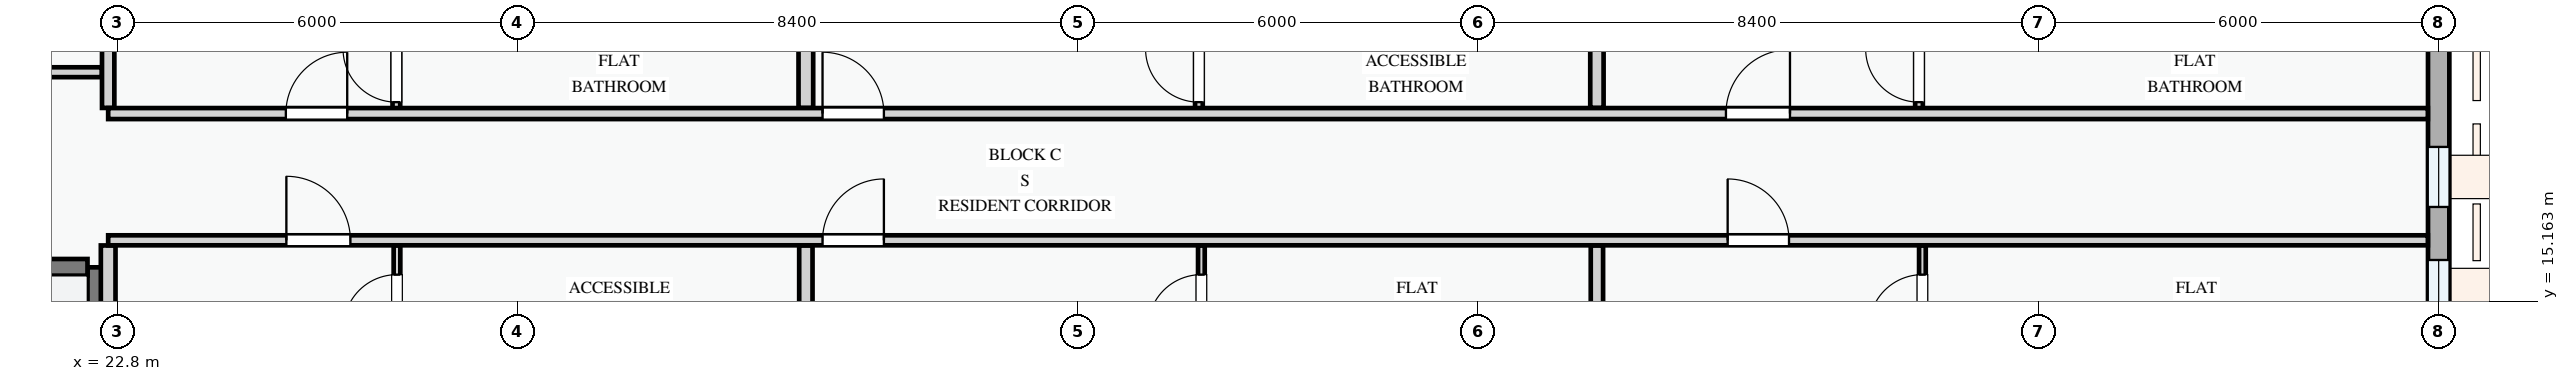
"""IFC4 building model, lengths in metres.
Left out: names, types, materials, properties, quantities, classifications, styles, units other than length and angle.
Written with IfcOpenShell. Run it as: python <this file> out.ifc"""

import sys

from ifc_helpers import new_model, si_unit, direction, frame, frame_2d, origin, place, context, subcontext, project, spatial, rectangle, extrude, element, fill, save


model = new_model("IFC4")
c1 = context("Model", 3, precision=1e-05, world=origin(), true_north=direction((0.0, 1.0)))
c2 = subcontext(c1, "Body", "Model", "MODEL_VIEW")
j1 = project(units=[si_unit("LENGTHUNIT", "METRE"), si_unit("PLANEANGLEUNIT", "RADIAN")], contexts=[c1])
p1 = place(None, origin())
s1 = spatial("IfcSite", under=j1, at=p1, CompositionType="ELEMENT")
p2 = place(p1, origin())
s2 = spatial("IfcBuilding", under=s1, at=p2, CompositionType="ELEMENT")
p3 = place(p2, frame((0.0, 0.0, 14.7)))
s3 = spatial("IfcBuildingStorey", under=s2, at=p3, CompositionType="ELEMENT", Elevation=14.7)
p4 = place(p3, frame((57.6, 14.4, 0.0), z_axis=(0.0, 0.0, 1.0), x_axis=(0.0, 1.0, 0.0)))
e1 = element("IfcWall", 1, at=p4, inside=s3, PredefinedType="STANDARD", context=c2, shape_type="SweptSolid", body=[
    extrude(rectangle(XDim=8.4, YDim=0.32, at=frame_2d((4.2, 0.0))), origin(), (0.0, 0.0, 1.0), 2.425),
])
p5 = place(p4, frame((0.485, 0.0, 0.78)))
e2 = element("IfcOpeningElement", 2, at=p5, cuts=e1, PredefinedType="OPENING", context=c2, shape_type="SweptSolid", body=[
    extrude(rectangle(XDim=0.9, YDim=1.2, at=frame_2d((0.45, 0.6))), frame((0.0, 0.17, 0.0), z_axis=(0.0, -1.0, 0.0), x_axis=(1.0, 0.0, 0.0)), (0.0, 0.0, 1.0), 0.34),
])
p6 = place(p4, frame((2.18, 0.0, 0.78)))
e3 = element("IfcOpeningElement", 3, at=p6, cuts=e1, PredefinedType="OPENING", context=c2, shape_type="SweptSolid", body=[
    extrude(rectangle(XDim=0.9, YDim=1.2, at=frame_2d((0.45, 0.6))), frame((0.0, 0.17, 0.0), z_axis=(0.0, -1.0, 0.0), x_axis=(1.0, 0.0, 0.0)), (0.0, 0.0, 1.0), 0.34),
])
p7 = place(p4, frame((6.483, 0.0, 0.78)))
e4 = element("IfcOpeningElement", 4, at=p7, cuts=e1, PredefinedType="OPENING", context=c2, shape_type="SweptSolid", body=[
    extrude(rectangle(XDim=1.3, YDim=1.4, at=frame_2d((0.65, 0.7))), frame((0.0, 0.17, 0.0), z_axis=(0.0, -1.0, 0.0), x_axis=(1.0, 0.0, 0.0)), (0.0, 0.0, 1.0), 0.34),
])
p8 = place(p3, frame((22.475, 8.75, 0.0), z_axis=(0.0, 0.0, 1.0), x_axis=(0.0, 1.0, 0.0)))
e5 = element("IfcWall", 5, at=p8, inside=s3, PredefinedType="SHEAR", context=c2, shape_type="SweptSolid", body=[
    extrude(rectangle(XDim=6.925, YDim=0.25, at=frame_2d((3.462, 0.0))), origin(), (0.0, 0.0, 1.0), 3.0),
])
p9 = place(p3, frame((8.85, 15.675, 0.0), z_axis=(0.0, 0.0, 1.0), x_axis=(1.0, 0.0, 0.0)))
e6 = element("IfcWall", 6, at=p9, inside=s3, PredefinedType="SHEAR", context=c2, shape_type="SweptSolid", body=[
    extrude(rectangle(XDim=13.5, YDim=0.25, at=frame_2d((6.75, 0.0))), origin(), (0.0, 0.0, 1.0), 3.0),
])
p10 = place(p9, frame((6.2, 0.0, 0.0)))
e7 = element("IfcOpeningElement", 7, at=p10, cuts=e6, PredefinedType="OPENING", context=c2, shape_type="SweptSolid", body=[
    extrude(rectangle(XDim=1.1, YDim=2.15, at=frame_2d((0.55, 1.075))), frame((0.0, 0.135, 0.0), z_axis=(0.0, -1.0, 0.0), x_axis=(1.0, 0.0, 0.0)), (0.0, 0.0, 1.0), 0.27),
])
p11 = place(p3, frame((18.025, 18.6, 0.0), z_axis=(0.0, 0.0, 1.0), x_axis=(1.0, 0.0, 0.0)))
e8 = element("IfcWall", 8, at=p11, inside=s3, PredefinedType="PARTITIONING", context=c2, shape_type="SweptSolid", body=[
    extrude(rectangle(XDim=4.541, YDim=0.148, at=frame_2d((2.27, 0.0))), origin(), (0.0, 0.0, 1.0), 3.0),
])
p12 = place(p11, frame((1.65, 0.0, 0.0)))
e9 = element("IfcOpeningElement", 9, at=p12, cuts=e8, PredefinedType="OPENING", context=c2, shape_type="SweptSolid", body=[
    extrude(rectangle(XDim=1.0, YDim=2.15, at=frame_2d((0.5, 1.075))), frame((0.0, 0.084, 0.0), z_axis=(0.0, -1.0, 0.0), x_axis=(1.0, 0.0, 0.0)), (0.0, 0.0, 1.0), 0.168),
])
p13 = place(p3, frame((26.99, 8.562, 0.0), z_axis=(0.0, 0.0, 1.0), x_axis=(0.0, 1.0, 0.0)))
e10 = element("IfcWall", 10, at=p13, inside=s3, PredefinedType="PARTITIONING", context=c2, shape_type="SweptSolid", body=[
    extrude(rectangle(XDim=7.441, YDim=0.1, at=frame_2d((3.72, 0.0))), origin(), (0.0, 0.0, 1.0), 3.0),
])
p14 = place(p13, frame((1.302, 0.0, 0.0)))
e11 = element("IfcOpeningElement", 11, at=p14, cuts=e10, PredefinedType="OPENING", context=c2, shape_type="SweptSolid", body=[
    extrude(rectangle(XDim=0.85, YDim=2.1, at=frame_2d((0.425, 1.05))), frame((0.0, 0.06, 0.0), z_axis=(0.0, -1.0, 0.0), x_axis=(1.0, 0.0, 0.0)), (0.0, 0.0, 1.0), 0.12),
])
p15 = place(p13, frame((4.198, 0.0, 0.0)))
e12 = element("IfcOpeningElement", 12, at=p15, cuts=e10, PredefinedType="OPENING", context=c2, shape_type="SweptSolid", body=[
    extrude(rectangle(XDim=0.85, YDim=2.1, at=frame_2d((0.425, 1.05))), frame((0.0, 0.06, 0.0), z_axis=(0.0, -1.0, 0.0), x_axis=(1.0, 0.0, 0.0)), (0.0, 0.0, 1.0), 0.12),
])
p16 = place(p13, frame((6.204, 0.0, 0.0)))
e13 = element("IfcOpeningElement", 13, at=p16, cuts=e10, PredefinedType="OPENING", context=c2, shape_type="SweptSolid", body=[
    extrude(rectangle(XDim=0.8, YDim=2.1, at=frame_2d((0.4, 1.05))), frame((0.0, 0.06, 0.0), z_axis=(0.0, -1.0, 0.0), x_axis=(1.0, 0.0, 0.0)), (0.0, 0.0, 1.0), 0.12),
])
p17 = place(p3, frame((26.981, 17.98, 0.0), z_axis=(0.0, 0.0, 1.0), x_axis=(0.0, 1.0, 0.0)))
e14 = element("IfcWall", 14, at=p17, inside=s3, PredefinedType="PARTITIONING", context=c2, shape_type="SweptSolid", body=[
    extrude(rectangle(XDim=4.658, YDim=0.115, at=frame_2d((2.329, 0.0))), origin(), (0.0, 0.0, 1.0), 3.0),
])
p18 = place(p17, frame((0.171, 0.0, 0.0)))
e15 = element("IfcOpeningElement", 15, at=p18, cuts=e14, PredefinedType="OPENING", context=c2, shape_type="SweptSolid", body=[
    extrude(rectangle(XDim=0.8, YDim=2.1, at=frame_2d((0.4, 1.05))), frame((0.0, 0.067, 0.0), z_axis=(0.0, -1.0, 0.0), x_axis=(1.0, 0.0, 0.0)), (0.0, 0.0, 1.0), 0.135),
])
p19 = place(p17, frame((1.384, 0.0, 0.0)))
e16 = element("IfcOpeningElement", 16, at=p19, cuts=e14, PredefinedType="OPENING", context=c2, shape_type="SweptSolid", body=[
    extrude(rectangle(XDim=0.85, YDim=2.1, at=frame_2d((0.425, 1.05))), frame((0.0, 0.067, 0.0), z_axis=(0.0, -1.0, 0.0), x_axis=(1.0, 0.0, 0.0)), (0.0, 0.0, 1.0), 0.135),
])
p20 = place(p17, frame((3.193, 0.0, 0.0)))
e17 = element("IfcOpeningElement", 17, at=p20, cuts=e14, PredefinedType="OPENING", context=c2, shape_type="SweptSolid", body=[
    extrude(rectangle(XDim=0.85, YDim=2.1, at=frame_2d((0.425, 1.05))), frame((0.0, 0.067, 0.0), z_axis=(0.0, -1.0, 0.0), x_axis=(1.0, 0.0, 0.0)), (0.0, 0.0, 1.0), 0.135),
])
p21 = place(p3, frame((22.66, 8.562, 0.0), z_axis=(0.0, 0.0, 1.0), x_axis=(0.0, 1.0, 0.0)))
e18 = element("IfcWall", 18, at=p21, inside=s3, PredefinedType="PARTITIONING", context=c2, shape_type="SweptSolid", body=[
    extrude(rectangle(XDim=7.441, YDim=0.22, at=frame_2d((3.72, 0.0))), origin(), (0.0, 0.0, 1.0), 2.425),
])
p22 = place(p3, frame((22.66, 18.064, 0.0), z_axis=(0.0, 0.0, 1.0), x_axis=(0.0, 1.0, 0.0)))
e19 = element("IfcWall", 19, at=p22, inside=s3, PredefinedType="PARTITIONING", context=c2, shape_type="SweptSolid", body=[
    extrude(rectangle(XDim=4.676, YDim=0.185, at=frame_2d((2.338, 0.0))), origin(), (0.0, 0.0, 1.0), 2.425),
])
p23 = place(p3, frame((39.05, 8.562, 0.0), z_axis=(0.0, 0.0, 1.0), x_axis=(0.0, 1.0, 0.0)))
e20 = element("IfcWall", 20, at=p23, inside=s3, PredefinedType="PARTITIONING", context=c2, shape_type="SweptSolid", body=[
    extrude(rectangle(XDim=7.441, YDim=0.1, at=frame_2d((3.72, 0.0))), origin(), (0.0, 0.0, 1.0), 3.0),
])
p24 = place(p23, frame((1.302, 0.0, 0.0)))
e21 = element("IfcOpeningElement", 21, at=p24, cuts=e20, PredefinedType="OPENING", context=c2, shape_type="SweptSolid", body=[
    extrude(rectangle(XDim=0.82, YDim=2.08, at=frame_2d((0.41, 1.04))), frame((0.0, 0.06, 0.0), z_axis=(0.0, -1.0, 0.0), x_axis=(1.0, 0.0, 0.0)), (0.0, 0.0, 1.0), 0.12),
])
p25 = place(p23, frame((4.198, 0.0, 0.0)))
e22 = element("IfcOpeningElement", 22, at=p25, cuts=e20, PredefinedType="OPENING", context=c2, shape_type="SweptSolid", body=[
    extrude(rectangle(XDim=0.85, YDim=2.1, at=frame_2d((0.425, 1.05))), frame((0.0, 0.06, 0.0), z_axis=(0.0, -1.0, 0.0), x_axis=(1.0, 0.0, 0.0)), (0.0, 0.0, 1.0), 0.12),
])
p26 = place(p23, frame((6.204, 0.0, 0.0)))
e23 = element("IfcOpeningElement", 23, at=p26, cuts=e20, PredefinedType="OPENING", context=c2, shape_type="SweptSolid", body=[
    extrude(rectangle(XDim=0.8, YDim=2.1, at=frame_2d((0.4, 1.05))), frame((0.0, 0.06, 0.0), z_axis=(0.0, -1.0, 0.0), x_axis=(1.0, 0.0, 0.0)), (0.0, 0.0, 1.0), 0.12),
])
p27 = place(p3, frame((39.013, 17.98, 0.0), z_axis=(0.0, 0.0, 1.0), x_axis=(0.0, 1.0, 0.0)))
e24 = element("IfcWall", 24, at=p27, inside=s3, PredefinedType="PARTITIONING", context=c2, shape_type="SweptSolid", body=[
    extrude(rectangle(XDim=4.658, YDim=0.115, at=frame_2d((2.329, 0.0))), origin(), (0.0, 0.0, 1.0), 3.0),
])
p28 = place(p27, frame((0.171, 0.0, 0.0)))
e25 = element("IfcOpeningElement", 25, at=p28, cuts=e24, PredefinedType="OPENING", context=c2, shape_type="SweptSolid", body=[
    extrude(rectangle(XDim=0.8, YDim=2.1, at=frame_2d((0.4, 1.05))), frame((0.0, 0.067, 0.0), z_axis=(0.0, -1.0, 0.0), x_axis=(1.0, 0.0, 0.0)), (0.0, 0.0, 1.0), 0.135),
])
p29 = place(p27, frame((1.384, 0.0, 0.0)))
e26 = element("IfcOpeningElement", 26, at=p29, cuts=e24, PredefinedType="OPENING", context=c2, shape_type="SweptSolid", body=[
    extrude(rectangle(XDim=0.82, YDim=2.08, at=frame_2d((0.41, 1.04))), frame((0.0, 0.067, 0.0), z_axis=(0.0, -1.0, 0.0), x_axis=(1.0, 0.0, 0.0)), (0.0, 0.0, 1.0), 0.135),
])
p30 = place(p27, frame((3.193, 0.0, 0.0)))
e27 = element("IfcOpeningElement", 27, at=p30, cuts=e24, PredefinedType="OPENING", context=c2, shape_type="SweptSolid", body=[
    extrude(rectangle(XDim=0.85, YDim=2.1, at=frame_2d((0.425, 1.05))), frame((0.0, 0.067, 0.0), z_axis=(0.0, -1.0, 0.0), x_axis=(1.0, 0.0, 0.0)), (0.0, 0.0, 1.0), 0.135),
])
p31 = place(p3, frame((33.12, 8.562, 0.0), z_axis=(0.0, 0.0, 1.0), x_axis=(0.0, 1.0, 0.0)))
e28 = element("IfcWall", 28, at=p31, inside=s3, PredefinedType="PARTITIONING", context=c2, shape_type="SweptSolid", body=[
    extrude(rectangle(XDim=7.441, YDim=0.2, at=frame_2d((3.72, 0.0))), origin(), (0.0, 0.0, 1.0), 2.585),
])
p32 = place(p3, frame((33.12, 18.064, 0.0), z_axis=(0.0, 0.0, 1.0), x_axis=(0.0, 1.0, 0.0)))
e29 = element("IfcWall", 29, at=p32, inside=s3, PredefinedType="PARTITIONING", context=c2, shape_type="SweptSolid", body=[
    extrude(rectangle(XDim=4.573, YDim=0.22, at=frame_2d((2.287, 0.0))), origin(), (0.0, 0.0, 1.0), 2.585),
])
p33 = place(p3, frame((49.86, 8.562, 0.0), z_axis=(0.0, 0.0, 1.0), x_axis=(0.0, 1.0, 0.0)))
e30 = element("IfcWall", 30, at=p33, inside=s3, PredefinedType="PARTITIONING", context=c2, shape_type="SweptSolid", body=[
    extrude(rectangle(XDim=7.441, YDim=0.1, at=frame_2d((3.72, 0.0))), origin(), (0.0, 0.0, 1.0), 3.0),
])
p34 = place(p33, frame((1.302, 0.0, 0.0)))
e31 = element("IfcOpeningElement", 31, at=p34, cuts=e30, PredefinedType="OPENING", context=c2, shape_type="SweptSolid", body=[
    extrude(rectangle(XDim=0.85, YDim=2.1, at=frame_2d((0.425, 1.05))), frame((0.0, 0.06, 0.0), z_axis=(0.0, -1.0, 0.0), x_axis=(1.0, 0.0, 0.0)), (0.0, 0.0, 1.0), 0.12),
])
p35 = place(p33, frame((4.198, 0.0, 0.0)))
e32 = element("IfcOpeningElement", 32, at=p35, cuts=e30, PredefinedType="OPENING", context=c2, shape_type="SweptSolid", body=[
    extrude(rectangle(XDim=0.85, YDim=2.1, at=frame_2d((0.425, 1.05))), frame((0.0, 0.06, 0.0), z_axis=(0.0, -1.0, 0.0), x_axis=(1.0, 0.0, 0.0)), (0.0, 0.0, 1.0), 0.12),
])
p36 = place(p33, frame((6.204, 0.0, 0.0)))
e33 = element("IfcOpeningElement", 33, at=p36, cuts=e30, PredefinedType="OPENING", context=c2, shape_type="SweptSolid", body=[
    extrude(rectangle(XDim=0.8, YDim=2.1, at=frame_2d((0.4, 1.05))), frame((0.0, 0.06, 0.0), z_axis=(0.0, -1.0, 0.0), x_axis=(1.0, 0.0, 0.0)), (0.0, 0.0, 1.0), 0.12),
])
p37 = place(p3, frame((49.809, 17.98, 0.0), z_axis=(0.0, 0.0, 1.0), x_axis=(0.0, 1.0, 0.0)))
e34 = element("IfcWall", 34, at=p37, inside=s3, PredefinedType="PARTITIONING", context=c2, shape_type="SweptSolid", body=[
    extrude(rectangle(XDim=4.658, YDim=0.115, at=frame_2d((2.329, 0.0))), origin(), (0.0, 0.0, 1.0), 3.0),
])
p38 = place(p37, frame((0.171, 0.0, 0.0)))
e35 = element("IfcOpeningElement", 35, at=p38, cuts=e34, PredefinedType="OPENING", context=c2, shape_type="SweptSolid", body=[
    extrude(rectangle(XDim=0.8, YDim=2.1, at=frame_2d((0.4, 1.05))), frame((0.0, 0.067, 0.0), z_axis=(0.0, -1.0, 0.0), x_axis=(1.0, 0.0, 0.0)), (0.0, 0.0, 1.0), 0.135),
])
p39 = place(p37, frame((1.384, 0.0, 0.0)))
e36 = element("IfcOpeningElement", 36, at=p39, cuts=e34, PredefinedType="OPENING", context=c2, shape_type="SweptSolid", body=[
    extrude(rectangle(XDim=0.85, YDim=2.1, at=frame_2d((0.425, 1.05))), frame((0.0, 0.067, 0.0), z_axis=(0.0, -1.0, 0.0), x_axis=(1.0, 0.0, 0.0)), (0.0, 0.0, 1.0), 0.135),
])
p40 = place(p37, frame((3.193, 0.0, 0.0)))
e37 = element("IfcOpeningElement", 37, at=p40, cuts=e34, PredefinedType="OPENING", context=c2, shape_type="SweptSolid", body=[
    extrude(rectangle(XDim=0.85, YDim=2.1, at=frame_2d((0.425, 1.05))), frame((0.0, 0.067, 0.0), z_axis=(0.0, -1.0, 0.0), x_axis=(1.0, 0.0, 0.0)), (0.0, 0.0, 1.0), 0.135),
])
p41 = place(p3, frame((44.98, 8.562, 0.0), z_axis=(0.0, 0.0, 1.0), x_axis=(0.0, 1.0, 0.0)))
e38 = element("IfcWall", 38, at=p41, inside=s3, PredefinedType="PARTITIONING", context=c2, shape_type="SweptSolid", body=[
    extrude(rectangle(XDim=7.441, YDim=0.185, at=frame_2d((3.72, 0.0))), origin(), (0.0, 0.0, 1.0), 3.0),
])
p42 = place(p3, frame((44.98, 18.064, 0.0), z_axis=(0.0, 0.0, 1.0), x_axis=(0.0, 1.0, 0.0)))
e39 = element("IfcWall", 39, at=p42, inside=s3, PredefinedType="PARTITIONING", context=c2, shape_type="SweptSolid", body=[
    extrude(rectangle(XDim=4.573, YDim=0.2, at=frame_2d((2.287, 0.0))), origin(), (0.0, 0.0, 1.0), 3.0),
])
p43 = place(p3, frame((22.66, 16.08, 0.0), z_axis=(0.0, 0.0, 1.0), x_axis=(1.0, 0.0, 0.0)))
e40 = element("IfcWall", 40, at=p43, inside=s3, PredefinedType="PARTITIONING", context=c2, shape_type="SweptSolid", body=[
    extrude(rectangle(XDim=34.778, YDim=0.15, at=frame_2d((17.389, 0.0))), origin(), (0.0, 0.0, 1.0), 3.0),
])
p44 = place(p43, frame((2.672, 0.0, 0.0)))
e41 = element("IfcOpeningElement", 41, at=p44, cuts=e40, PredefinedType="OPENING", context=c2, shape_type="SweptSolid", body=[
    extrude(rectangle(XDim=0.96, YDim=2.12, at=frame_2d((0.48, 1.06))), frame((0.0, 0.085, 0.0), z_axis=(0.0, -1.0, 0.0), x_axis=(1.0, 0.0, 0.0)), (0.0, 0.0, 1.0), 0.17),
])
p45 = place(p43, frame((10.71, 0.0, 0.0)))
e42 = element("IfcOpeningElement", 42, at=p45, cuts=e40, PredefinedType="OPENING", context=c2, shape_type="SweptSolid", body=[
    extrude(rectangle(XDim=0.92, YDim=2.1, at=frame_2d((0.46, 1.05))), frame((0.0, 0.085, 0.0), z_axis=(0.0, -1.0, 0.0), x_axis=(1.0, 0.0, 0.0)), (0.0, 0.0, 1.0), 0.17),
])
p46 = place(p43, frame((24.28, 0.0, 0.0)))
e43 = element("IfcOpeningElement", 43, at=p46, cuts=e40, PredefinedType="OPENING", context=c2, shape_type="SweptSolid", body=[
    extrude(rectangle(XDim=0.92, YDim=2.1, at=frame_2d((0.46, 1.05))), frame((0.0, 0.085, 0.0), z_axis=(0.0, -1.0, 0.0), x_axis=(1.0, 0.0, 0.0)), (0.0, 0.0, 1.0), 0.17),
])
p47 = place(p3, frame((22.66, 17.98, 0.0), z_axis=(0.0, 0.0, 1.0), x_axis=(1.0, 0.0, 0.0)))
e44 = element("IfcWall", 44, at=p47, inside=s3, PredefinedType="PARTITIONING", context=c2, shape_type="SweptSolid", body=[
    extrude(rectangle(XDim=34.778, YDim=0.165, at=frame_2d((17.389, 0.0))), origin(), (0.0, 0.0, 1.0), 3.0),
])
p48 = place(p47, frame((2.664, 0.0, 0.0)))
e45 = element("IfcOpeningElement", 45, at=p48, cuts=e44, PredefinedType="OPENING", context=c2, shape_type="SweptSolid", body=[
    extrude(rectangle(XDim=0.92, YDim=2.1, at=frame_2d((0.46, 1.05))), frame((0.0, 0.093, 0.0), z_axis=(0.0, -1.0, 0.0), x_axis=(1.0, 0.0, 0.0)), (0.0, 0.0, 1.0), 0.185),
])
p49 = place(p47, frame((10.71, 0.0, 0.0)))
e46 = element("IfcOpeningElement", 46, at=p49, cuts=e44, PredefinedType="OPENING", context=c2, shape_type="SweptSolid", body=[
    extrude(rectangle(XDim=0.92, YDim=2.1, at=frame_2d((0.46, 1.05))), frame((0.0, 0.093, 0.0), z_axis=(0.0, -1.0, 0.0), x_axis=(1.0, 0.0, 0.0)), (0.0, 0.0, 1.0), 0.185),
])
p50 = place(p47, frame((24.254, 0.0, 0.0)))
e47 = element("IfcOpeningElement", 47, at=p50, cuts=e44, PredefinedType="OPENING", context=c2, shape_type="SweptSolid", body=[
    extrude(rectangle(XDim=0.96, YDim=2.12, at=frame_2d((0.48, 1.06))), frame((0.0, 0.093, 0.0), z_axis=(0.0, -1.0, 0.0), x_axis=(1.0, 0.0, 0.0)), (0.0, 0.0, 1.0), 0.185),
])
p51 = place(p5, origin())
e48 = element("IfcWindow", 48, at=p51, inside=s3, PartitioningType="SINGLE_PANEL", PredefinedType="WINDOW", context=c2, shape_type="SweptSolid", body=[
    extrude(rectangle(XDim=0.9, YDim=1.2, at=frame_2d((0.45, 0.6))), frame((0.0, 0.03, 0.0), z_axis=(0.0, -1.0, 0.0), x_axis=(1.0, 0.0, 0.0)), (0.0, 0.0, 1.0), 0.06),
])
fill(e2, e48)
p52 = place(p6, origin())
e49 = element("IfcWindow", 49, at=p52, inside=s3, PartitioningType="SINGLE_PANEL", PredefinedType="WINDOW", context=c2, shape_type="SweptSolid", body=[
    extrude(rectangle(XDim=0.9, YDim=1.2, at=frame_2d((0.45, 0.6))), frame((0.0, 0.03, 0.0), z_axis=(0.0, -1.0, 0.0), x_axis=(1.0, 0.0, 0.0)), (0.0, 0.0, 1.0), 0.06),
])
fill(e3, e49)
p53 = place(p16, origin())
e50 = element("IfcDoor", 50, at=p53, inside=s3, OperationType="SINGLE_SWING_LEFT", PredefinedType="DOOR", context=c2, shape_type="SweptSolid", body=[
    extrude(rectangle(XDim=0.8, YDim=2.1, at=frame_2d((0.4, 1.05))), frame((0.0, 0.025, 0.0), z_axis=(0.0, -1.0, 0.0), x_axis=(1.0, 0.0, 0.0)), (0.0, 0.0, 1.0), 0.05),
])
fill(e13, e50)
p54 = place(p18, origin())
e51 = element("IfcDoor", 51, at=p54, inside=s3, OperationType="SINGLE_SWING_RIGHT", PredefinedType="DOOR", context=c2, shape_type="SweptSolid", body=[
    extrude(rectangle(XDim=0.8, YDim=2.1, at=frame_2d((0.4, 1.05))), frame((0.0, 0.025, 0.0), z_axis=(0.0, -1.0, 0.0), x_axis=(1.0, 0.0, 0.0)), (0.0, 0.0, 1.0), 0.05),
])
fill(e15, e51)
p55 = place(p26, origin())
e52 = element("IfcDoor", 52, at=p55, inside=s3, OperationType="SINGLE_SWING_LEFT", PredefinedType="DOOR", context=c2, shape_type="SweptSolid", body=[
    extrude(rectangle(XDim=0.8, YDim=2.1, at=frame_2d((0.4, 1.05))), frame((0.0, 0.025, 0.0), z_axis=(0.0, -1.0, 0.0), x_axis=(1.0, 0.0, 0.0)), (0.0, 0.0, 1.0), 0.05),
])
fill(e23, e52)
p56 = place(p28, origin())
e53 = element("IfcDoor", 53, at=p56, inside=s3, OperationType="SINGLE_SWING_RIGHT", PredefinedType="DOOR", context=c2, shape_type="SweptSolid", body=[
    extrude(rectangle(XDim=0.8, YDim=2.1, at=frame_2d((0.4, 1.05))), frame((0.0, 0.025, 0.0), z_axis=(0.0, -1.0, 0.0), x_axis=(1.0, 0.0, 0.0)), (0.0, 0.0, 1.0), 0.05),
])
fill(e25, e53)
p57 = place(p36, origin())
e54 = element("IfcDoor", 54, at=p57, inside=s3, OperationType="SINGLE_SWING_LEFT", PredefinedType="DOOR", context=c2, shape_type="SweptSolid", body=[
    extrude(rectangle(XDim=0.8, YDim=2.1, at=frame_2d((0.4, 1.05))), frame((0.0, 0.025, 0.0), z_axis=(0.0, -1.0, 0.0), x_axis=(1.0, 0.0, 0.0)), (0.0, 0.0, 1.0), 0.05),
])
fill(e33, e54)
p58 = place(p38, origin())
e55 = element("IfcDoor", 55, at=p58, inside=s3, OperationType="SINGLE_SWING_RIGHT", PredefinedType="DOOR", context=c2, shape_type="SweptSolid", body=[
    extrude(rectangle(XDim=0.8, YDim=2.1, at=frame_2d((0.4, 1.05))), frame((0.0, 0.025, 0.0), z_axis=(0.0, -1.0, 0.0), x_axis=(1.0, 0.0, 0.0)), (0.0, 0.0, 1.0), 0.05),
])
fill(e35, e55)
p59 = place(p44, origin())
e56 = element("IfcDoor", 56, at=p59, inside=s3, OperationType="SINGLE_SWING_LEFT", PredefinedType="DOOR", context=c2, shape_type="SweptSolid", body=[
    extrude(rectangle(XDim=0.96, YDim=2.12, at=frame_2d((0.48, 1.06))), frame((0.0, 0.025, 0.0), z_axis=(0.0, -1.0, 0.0), x_axis=(1.0, 0.0, 0.0)), (0.0, 0.0, 1.0), 0.05),
])
fill(e41, e56)
p60 = place(p45, origin())
e57 = element("IfcDoor", 57, at=p60, inside=s3, OperationType="SINGLE_SWING_RIGHT", PredefinedType="DOOR", context=c2, shape_type="SweptSolid", body=[
    extrude(rectangle(XDim=0.92, YDim=2.1, at=frame_2d((0.46, 1.05))), frame((0.0, 0.025, 0.0), z_axis=(0.0, -1.0, 0.0), x_axis=(1.0, 0.0, 0.0)), (0.0, 0.0, 1.0), 0.05),
])
fill(e42, e57)
p61 = place(p46, origin())
e58 = element("IfcDoor", 58, at=p61, inside=s3, OperationType="SINGLE_SWING_LEFT", PredefinedType="DOOR", context=c2, shape_type="SweptSolid", body=[
    extrude(rectangle(XDim=0.92, YDim=2.1, at=frame_2d((0.46, 1.05))), frame((0.0, 0.025, 0.0), z_axis=(0.0, -1.0, 0.0), x_axis=(1.0, 0.0, 0.0)), (0.0, 0.0, 1.0), 0.05),
])
fill(e43, e58)
p62 = place(p48, origin())
e59 = element("IfcDoor", 59, at=p62, inside=s3, OperationType="SINGLE_SWING_RIGHT", PredefinedType="DOOR", context=c2, shape_type="SweptSolid", body=[
    extrude(rectangle(XDim=0.92, YDim=2.1, at=frame_2d((0.46, 1.05))), frame((0.0, 0.025, 0.0), z_axis=(0.0, -1.0, 0.0), x_axis=(1.0, 0.0, 0.0)), (0.0, 0.0, 1.0), 0.05),
])
fill(e45, e59)
p63 = place(p49, origin())
e60 = element("IfcDoor", 60, at=p63, inside=s3, OperationType="SINGLE_SWING_LEFT", PredefinedType="DOOR", context=c2, shape_type="SweptSolid", body=[
    extrude(rectangle(XDim=0.92, YDim=2.1, at=frame_2d((0.46, 1.05))), frame((0.0, 0.025, 0.0), z_axis=(0.0, -1.0, 0.0), x_axis=(1.0, 0.0, 0.0)), (0.0, 0.0, 1.0), 0.05),
])
fill(e46, e60)
p64 = place(p50, origin())
e61 = element("IfcDoor", 61, at=p64, inside=s3, OperationType="SINGLE_SWING_RIGHT", PredefinedType="DOOR", context=c2, shape_type="SweptSolid", body=[
    extrude(rectangle(XDim=0.96, YDim=2.12, at=frame_2d((0.48, 1.06))), frame((0.0, 0.025, 0.0), z_axis=(0.0, -1.0, 0.0), x_axis=(1.0, 0.0, 0.0)), (0.0, 0.0, 1.0), 0.05),
])
fill(e47, e61)
save(model, sys.argv[1])
